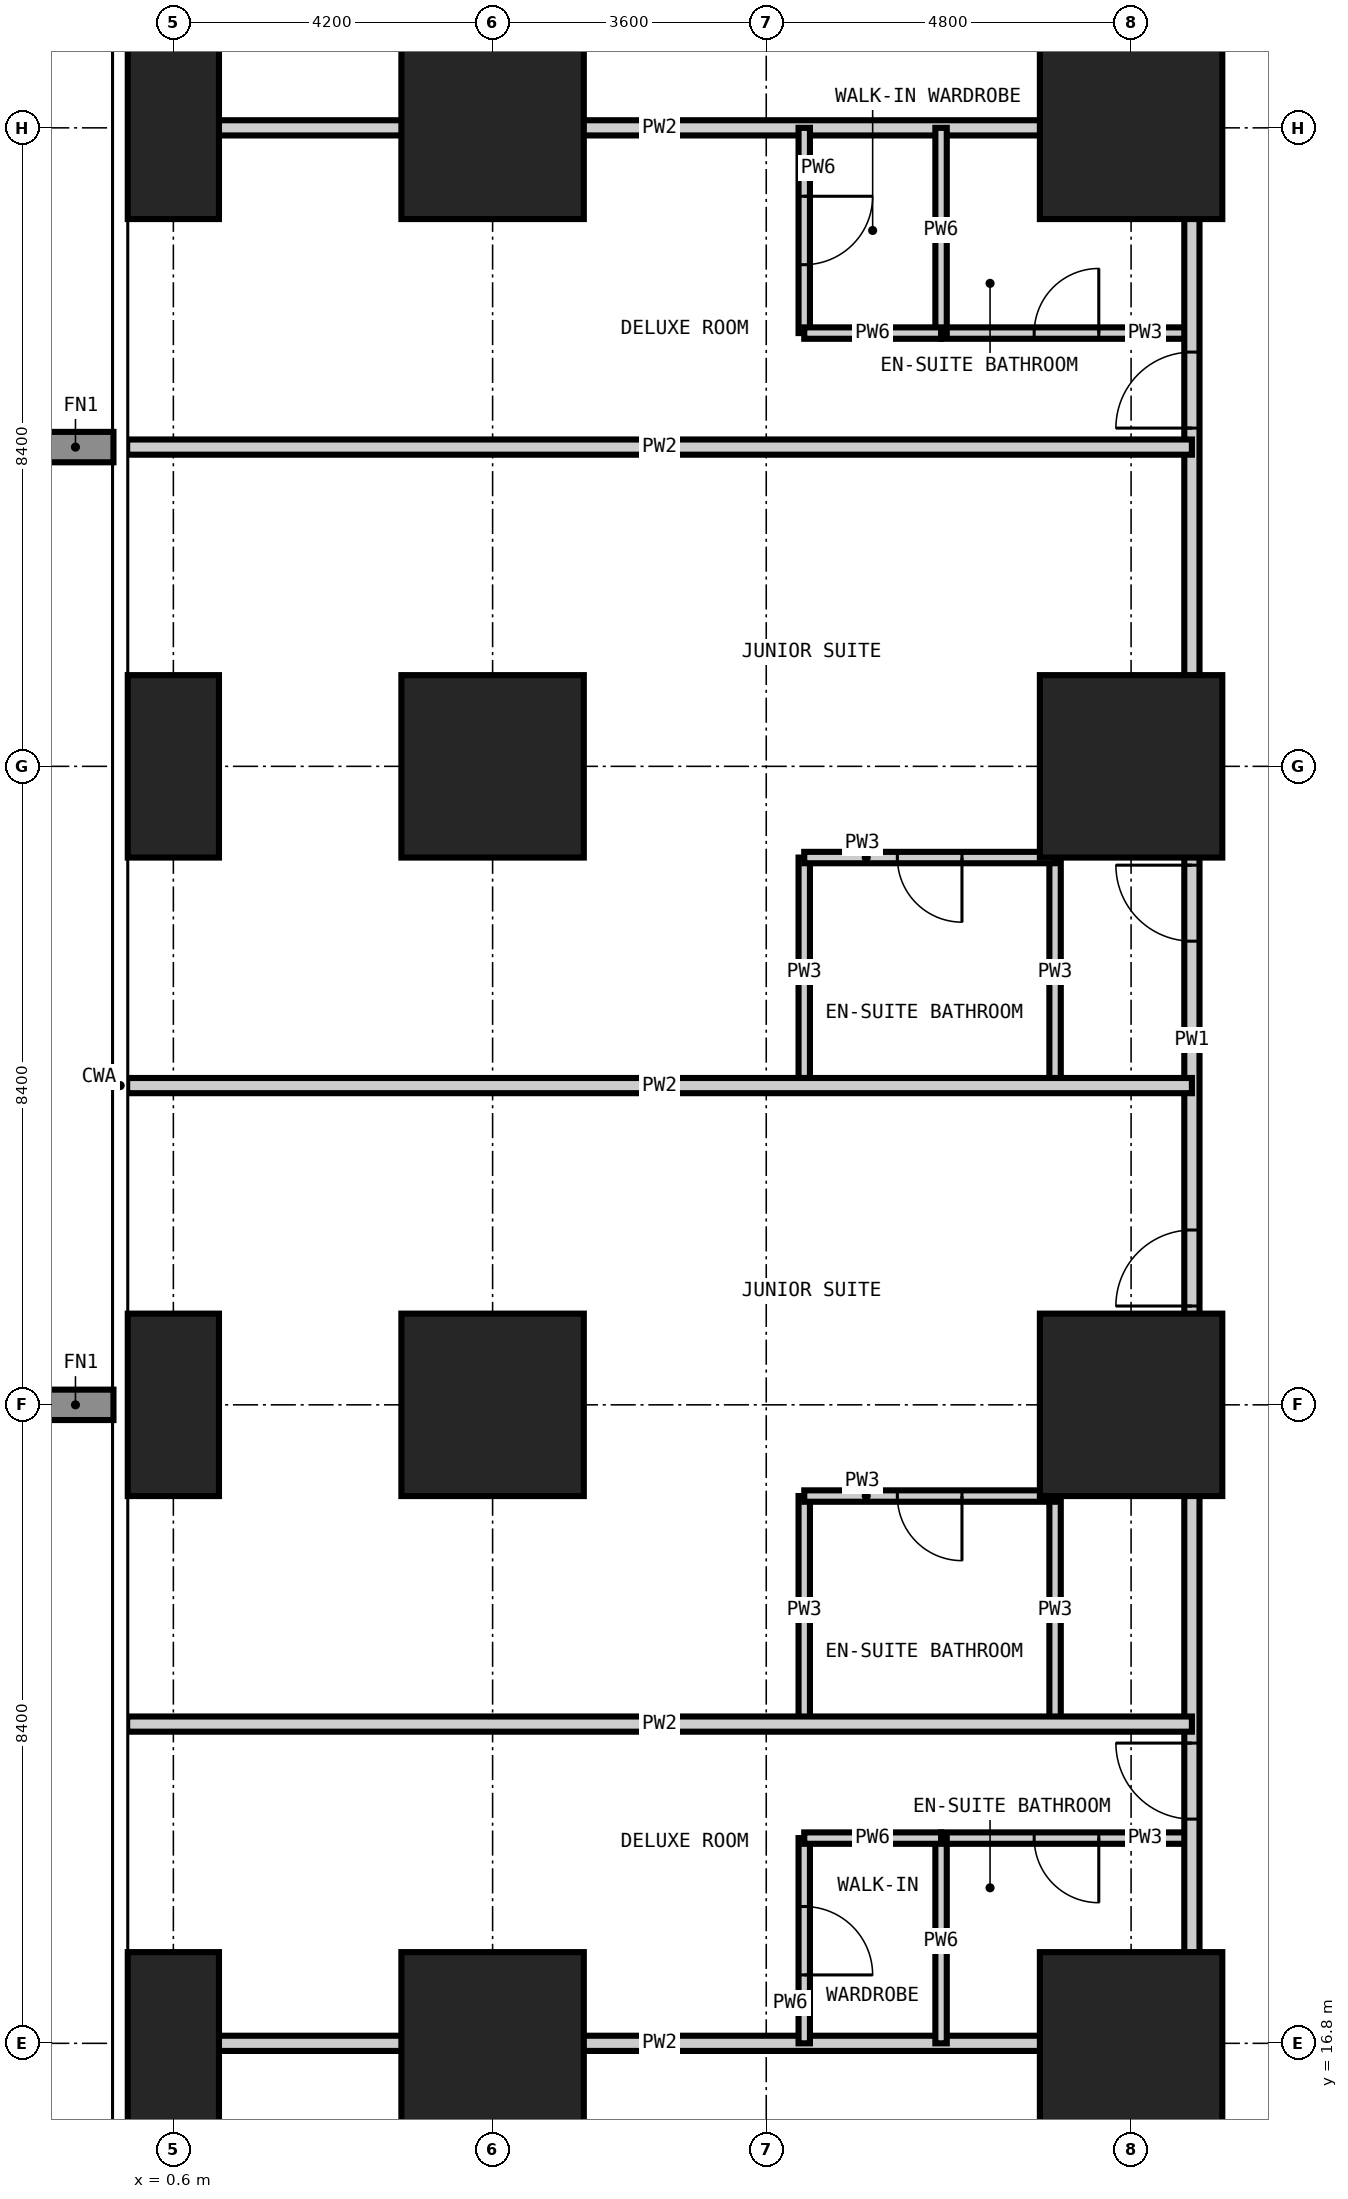
"""IFC4 building model, lengths in metres.
Left out: names, types, materials, properties, quantities, classifications, styles, units other than length and angle.
Written with IfcOpenShell. Run it as: python <this file> out.ifc"""

import sys

from ifc_helpers import new_model, si_unit, direction, frame, frame_2d, origin, origin_2d, place, context, subcontext, project, spatial, rectangle, extrude, element, fill, save


model = new_model("IFC4")
c1 = context("Model", 3, precision=1e-05, world=origin(), true_north=direction((0.0, 1.0)))
c2 = subcontext(c1, "Body", "Model", "MODEL_VIEW")
j1 = project(units=[si_unit("LENGTHUNIT", "METRE"), si_unit("PLANEANGLEUNIT", "RADIAN")], contexts=[c1])
p1 = place(None, origin())
s1 = spatial("IfcSite", under=j1, at=p1, CompositionType="ELEMENT")
p2 = place(p1, origin())
s2 = spatial("IfcBuilding", under=s1, at=p2, CompositionType="ELEMENT")
p3 = place(p2, frame((0.0, 0.0, 81.0)))
s3 = spatial("IfcBuildingStorey", under=s2, at=p3, CompositionType="ELEMENT", Elevation=81.0)
for number, where, z_axis, x_axis in (
    (1, (0.6, 16.8, -0.35), (0.0, 0.0, 1.0), (1.0, 0.0, 0.0)),
    (2, (0.6, 25.2, -0.35), (0.0, 0.0, 1.0), (1.0, 0.0, 0.0)),
    (3, (0.6, 33.6, -0.35), (0.0, 0.0, 1.0), (1.0, 0.0, 0.0)),
    (4, (0.6, 42.0, -0.35), (0.0, 0.0, 1.0), (1.0, 0.0, 0.0)),
):
    element("IfcColumn", number, at=place(p3, frame(where, z_axis=z_axis, x_axis=x_axis)), inside=s3, PredefinedType="COLUMN", context=c2, shape_type="SweptSolid", body=[
        extrude(rectangle(XDim=1.2, YDim=2.4, at=origin_2d()), origin(), (0.0, 0.0, 1.0), 3.6),
    ])
for number, where, z_axis, x_axis in (
    (5, (4.8, 16.8, -0.35), (0.0, 0.0, 1.0), (1.0, 0.0, 0.0)),
    (6, (4.8, 25.2, -0.35), (0.0, 0.0, 1.0), (1.0, 0.0, 0.0)),
    (7, (4.8, 33.6, -0.35), (0.0, 0.0, 1.0), (1.0, 0.0, 0.0)),
    (8, (4.8, 42.0, -0.35), (0.0, 0.0, 1.0), (1.0, 0.0, 0.0)),
    (9, (13.2, 16.8, -0.35), (0.0, 0.0, 1.0), (1.0, 0.0, 0.0)),
    (10, (13.2, 25.2, -0.35), (0.0, 0.0, 1.0), (1.0, 0.0, 0.0)),
    (11, (13.2, 33.6, -0.35), (0.0, 0.0, 1.0), (1.0, 0.0, 0.0)),
    (12, (13.2, 42.0, -0.35), (0.0, 0.0, 1.0), (1.0, 0.0, 0.0)),
):
    element("IfcColumn", number, at=place(p3, frame(where, z_axis=z_axis, x_axis=x_axis)), inside=s3, PredefinedType="COLUMN", context=c2, shape_type="SweptSolid", body=[
        extrude(rectangle(XDim=2.4, YDim=2.4, at=origin_2d()), origin(), (0.0, 0.0, 1.0), 3.6),
    ])
for number, where, z_axis, x_axis in (
    (13, (8.9, 21.0, 0.0), (0.0, 0.0, 1.0), (0.0, 1.0, 0.0)),
    (14, (8.9, 29.4, 0.0), (0.0, 0.0, 1.0), (0.0, 1.0, 0.0)),
    (15, (12.2, 21.0, 0.0), (0.0, 0.0, 1.0), (0.0, 1.0, 0.0)),
    (16, (12.2, 29.4, 0.0), (0.0, 0.0, 1.0), (0.0, 1.0, 0.0)),
):
    element("IfcWall", number, at=place(p3, frame(where, z_axis=z_axis, x_axis=x_axis)), inside=s3, PredefinedType="PARTITIONING", context=c2, shape_type="SweptSolid", body=[
        extrude(rectangle(XDim=3.0, YDim=0.15, at=frame_2d((1.5, 0.0))), origin(), (0.0, 0.0, 1.0), 3.25),
    ])
p4 = place(p3, frame((10.7, 19.5, 0.0), z_axis=(0.0, 0.0, 1.0), x_axis=(1.0, 0.0, 0.0)))
e17 = element("IfcWall", 17, at=p4, inside=s3, PredefinedType="PARTITIONING", context=c2, shape_type="SweptSolid", body=[
    extrude(rectangle(XDim=3.3, YDim=0.15, at=frame_2d((1.65, 0.0))), origin(), (0.0, 0.0, 1.0), 3.25),
])
p5 = place(p4, frame((1.225, 0.0, 0.0)))
e18 = element("IfcOpeningElement", 18, at=p5, cuts=e17, PredefinedType="OPENING", context=c2, shape_type="SweptSolid", body=[
    extrude(rectangle(XDim=0.85, YDim=2.1, at=frame_2d((0.425, 1.05))), frame((0.0, 0.085, 0.0), z_axis=(0.0, -1.0, 0.0), x_axis=(1.0, 0.0, 0.0)), (0.0, 0.0, 1.0), 0.17),
])
p6 = place(p3, frame((8.9, 24.0, 0.0), z_axis=(0.0, 0.0, 1.0), x_axis=(1.0, 0.0, 0.0)))
e19 = element("IfcWall", 19, at=p6, inside=s3, PredefinedType="PARTITIONING", context=c2, shape_type="SweptSolid", body=[
    extrude(rectangle(XDim=3.3, YDim=0.15, at=frame_2d((1.65, 0.0))), origin(), (0.0, 0.0, 1.0), 3.25),
])
p7 = place(p6, frame((1.225, 0.0, 0.0)))
e20 = element("IfcOpeningElement", 20, at=p7, cuts=e19, PredefinedType="OPENING", context=c2, shape_type="SweptSolid", body=[
    extrude(rectangle(XDim=0.85, YDim=2.1, at=frame_2d((0.425, 1.05))), frame((0.0, 0.085, 0.0), z_axis=(0.0, -1.0, 0.0), x_axis=(1.0, 0.0, 0.0)), (0.0, 0.0, 1.0), 0.17),
])
p8 = place(p3, frame((8.9, 32.4, 0.0), z_axis=(0.0, 0.0, 1.0), x_axis=(1.0, 0.0, 0.0)))
e21 = element("IfcWall", 21, at=p8, inside=s3, PredefinedType="PARTITIONING", context=c2, shape_type="SweptSolid", body=[
    extrude(rectangle(XDim=3.3, YDim=0.15, at=frame_2d((1.65, 0.0))), origin(), (0.0, 0.0, 1.0), 3.25),
])
p9 = place(p8, frame((1.225, 0.0, 0.0)))
e22 = element("IfcOpeningElement", 22, at=p9, cuts=e21, PredefinedType="OPENING", context=c2, shape_type="SweptSolid", body=[
    extrude(rectangle(XDim=0.85, YDim=2.1, at=frame_2d((0.425, 1.05))), frame((0.0, 0.085, 0.0), z_axis=(0.0, -1.0, 0.0), x_axis=(1.0, 0.0, 0.0)), (0.0, 0.0, 1.0), 0.17),
])
p10 = place(p3, frame((10.7, 39.3, 0.0), z_axis=(0.0, 0.0, 1.0), x_axis=(1.0, 0.0, 0.0)))
e23 = element("IfcWall", 23, at=p10, inside=s3, PredefinedType="PARTITIONING", context=c2, shape_type="SweptSolid", body=[
    extrude(rectangle(XDim=3.3, YDim=0.15, at=frame_2d((1.65, 0.0))), origin(), (0.0, 0.0, 1.0), 3.25),
])
p11 = place(p10, frame((1.225, 0.0, 0.0)))
e24 = element("IfcOpeningElement", 24, at=p11, cuts=e23, PredefinedType="OPENING", context=c2, shape_type="SweptSolid", body=[
    extrude(rectangle(XDim=0.85, YDim=2.1, at=frame_2d((0.425, 1.05))), frame((0.0, 0.085, 0.0), z_axis=(0.0, -1.0, 0.0), x_axis=(1.0, 0.0, 0.0)), (0.0, 0.0, 1.0), 0.17),
])
p12 = place(p3, frame((14.0, 14.0, 0.0), z_axis=(0.0, 0.0, 1.0), x_axis=(0.0, 1.0, 0.0)))
e25 = element("IfcWall", 25, at=p12, inside=s3, PredefinedType="PARTITIONING", context=c2, shape_type="SweptSolid", body=[
    extrude(rectangle(XDim=32.0, YDim=0.2, at=frame_2d((16.0, 0.0))), origin(), (0.0, 0.0, 1.0), 3.25),
])
p13 = place(p12, frame((5.75, 0.0, 0.0)))
e26 = element("IfcOpeningElement", 26, at=p13, cuts=e25, PredefinedType="OPENING", context=c2, shape_type="SweptSolid", body=[
    extrude(rectangle(XDim=1.0, YDim=2.2, at=frame_2d((0.5, 1.1))), frame((0.0, 0.11, 0.0), z_axis=(0.0, -1.0, 0.0), x_axis=(1.0, 0.0, 0.0)), (0.0, 0.0, 1.0), 0.22),
])
p14 = place(p12, frame((12.5, 0.0, 0.0)))
e27 = element("IfcOpeningElement", 27, at=p14, cuts=e25, PredefinedType="OPENING", context=c2, shape_type="SweptSolid", body=[
    extrude(rectangle(XDim=1.0, YDim=2.2, at=frame_2d((0.5, 1.1))), frame((0.0, 0.11, 0.0), z_axis=(0.0, -1.0, 0.0), x_axis=(1.0, 0.0, 0.0)), (0.0, 0.0, 1.0), 0.22),
])
p15 = place(p12, frame((17.3, 0.0, 0.0)))
e28 = element("IfcOpeningElement", 28, at=p15, cuts=e25, PredefinedType="OPENING", context=c2, shape_type="SweptSolid", body=[
    extrude(rectangle(XDim=1.0, YDim=2.2, at=frame_2d((0.5, 1.1))), frame((0.0, 0.11, 0.0), z_axis=(0.0, -1.0, 0.0), x_axis=(1.0, 0.0, 0.0)), (0.0, 0.0, 1.0), 0.22),
])
p16 = place(p12, frame((24.05, 0.0, 0.0)))
e29 = element("IfcOpeningElement", 29, at=p16, cuts=e25, PredefinedType="OPENING", context=c2, shape_type="SweptSolid", body=[
    extrude(rectangle(XDim=1.0, YDim=2.2, at=frame_2d((0.5, 1.1))), frame((0.0, 0.11, 0.0), z_axis=(0.0, -1.0, 0.0), x_axis=(1.0, 0.0, 0.0)), (0.0, 0.0, 1.0), 0.22),
])
p17 = place(p12, frame((0.5, 0.0, 0.0)))
e30 = element("IfcOpeningElement", 30, at=p17, cuts=e25, PredefinedType="OPENING", context=c2, shape_type="SweptSolid", body=[
    extrude(rectangle(XDim=1.0, YDim=2.2, at=frame_2d((0.5, 1.1))), frame((0.0, 0.11, 0.0), z_axis=(0.0, -1.0, 0.0), x_axis=(1.0, 0.0, 0.0)), (0.0, 0.0, 1.0), 0.22),
])
p18 = place(p12, frame((29.5, 0.0, 0.0)))
e31 = element("IfcOpeningElement", 31, at=p18, cuts=e25, PredefinedType="OPENING", context=c2, shape_type="SweptSolid", body=[
    extrude(rectangle(XDim=1.0, YDim=2.2, at=frame_2d((0.5, 1.1))), frame((0.0, 0.11, 0.0), z_axis=(0.0, -1.0, 0.0), x_axis=(1.0, 0.0, 0.0)), (0.0, 0.0, 1.0), 0.22),
])
for number, where, z_axis, x_axis in (
    (32, (-0.008, 16.8, 0.0), (0.0, 0.0, 1.0), (1.0, 0.0, 0.0)),
    (33, (-0.008, 21.0, 0.0), (0.0, 0.0, 1.0), (1.0, 0.0, 0.0)),
    (34, (-0.008, 29.4, 0.0), (0.0, 0.0, 1.0), (1.0, 0.0, 0.0)),
    (35, (-0.008, 37.8, 0.0), (0.0, 0.0, 1.0), (1.0, 0.0, 0.0)),
    (36, (-0.008, 42.0, 0.0), (0.0, 0.0, 1.0), (1.0, 0.0, 0.0)),
):
    element("IfcWall", number, at=place(p3, frame(where, z_axis=z_axis, x_axis=x_axis)), inside=s3, PredefinedType="PARTITIONING", context=c2, shape_type="SweptSolid", body=[
        extrude(rectangle(XDim=14.008, YDim=0.2, at=frame_2d((7.004, 0.0))), origin(), (0.0, 0.0, 1.0), 3.25),
    ])
p19 = place(p3, frame((8.9, 16.8, 0.0), z_axis=(0.0, 0.0, 1.0), x_axis=(0.0, 1.0, 0.0)))
e37 = element("IfcWall", 37, at=p19, inside=s3, PredefinedType="PARTITIONING", context=c2, shape_type="SweptSolid", body=[
    extrude(rectangle(XDim=2.7, YDim=0.15, at=frame_2d((1.35, 0.0))), origin(), (0.0, 0.0, 1.0), 3.25),
])
p20 = place(p19, frame((0.9, 0.0, 0.0)))
e38 = element("IfcOpeningElement", 38, at=p20, cuts=e37, PredefinedType="OPENING", context=c2, shape_type="SweptSolid", body=[
    extrude(rectangle(XDim=0.9, YDim=2.1, at=frame_2d((0.45, 1.05))), frame((0.0, 0.085, 0.0), z_axis=(0.0, -1.0, 0.0), x_axis=(1.0, 0.0, 0.0)), (0.0, 0.0, 1.0), 0.17),
])
p21 = place(p3, frame((8.9, 39.3, 0.0), z_axis=(0.0, 0.0, 1.0), x_axis=(0.0, 1.0, 0.0)))
e39 = element("IfcWall", 39, at=p21, inside=s3, PredefinedType="PARTITIONING", context=c2, shape_type="SweptSolid", body=[
    extrude(rectangle(XDim=2.7, YDim=0.15, at=frame_2d((1.35, 0.0))), origin(), (0.0, 0.0, 1.0), 3.25),
])
p22 = place(p21, frame((0.9, 0.0, 0.0)))
e40 = element("IfcOpeningElement", 40, at=p22, cuts=e39, PredefinedType="OPENING", context=c2, shape_type="SweptSolid", body=[
    extrude(rectangle(XDim=0.9, YDim=2.1, at=frame_2d((0.45, 1.05))), frame((0.0, 0.085, 0.0), z_axis=(0.0, -1.0, 0.0), x_axis=(1.0, 0.0, 0.0)), (0.0, 0.0, 1.0), 0.17),
])
for number, where, z_axis, x_axis in (
    (41, (10.7, 16.8, 0.0), (0.0, 0.0, 1.0), (0.0, 1.0, 0.0)),
    (42, (10.7, 39.3, 0.0), (0.0, 0.0, 1.0), (0.0, 1.0, 0.0)),
):
    element("IfcWall", number, at=place(p3, frame(where, z_axis=z_axis, x_axis=x_axis)), inside=s3, PredefinedType="PARTITIONING", context=c2, shape_type="SweptSolid", body=[
        extrude(rectangle(XDim=2.7, YDim=0.15, at=frame_2d((1.35, 0.0))), origin(), (0.0, 0.0, 1.0), 3.25),
    ])
for number, where, z_axis, x_axis in (
    (43, (8.9, 19.5, 0.0), (0.0, 0.0, 1.0), (1.0, 0.0, 0.0)),
    (44, (8.9, 39.3, 0.0), (0.0, 0.0, 1.0), (1.0, 0.0, 0.0)),
):
    element("IfcWall", number, at=place(p3, frame(where, z_axis=z_axis, x_axis=x_axis)), inside=s3, PredefinedType="PARTITIONING", context=c2, shape_type="SweptSolid", body=[
        extrude(rectangle(XDim=1.8, YDim=0.15, at=frame_2d((0.9, 0.0))), origin(), (0.0, 0.0, 1.0), 3.25),
    ])
p23 = place(p13, origin())
e45 = element("IfcDoor", 45, at=p23, inside=s3, OperationType="SINGLE_SWING_RIGHT", PredefinedType="DOOR", context=c2, shape_type="SweptSolid", body=[
    extrude(rectangle(XDim=1.0, YDim=2.2, at=frame_2d((0.5, 1.1))), frame((0.0, 0.025, 0.0), z_axis=(0.0, -1.0, 0.0), x_axis=(1.0, 0.0, 0.0)), (0.0, 0.0, 1.0), 0.05),
])
fill(e26, e45)
p24 = place(p5, frame((0.85, 0.0, 0.0), z_axis=(0.0, 0.0, 1.0), x_axis=(-1.0, 0.0, 0.0)))
e46 = element("IfcDoor", 46, at=p24, inside=s3, OperationType="SINGLE_SWING_LEFT", PredefinedType="DOOR", context=c2, shape_type="SweptSolid", body=[
    extrude(rectangle(XDim=0.85, YDim=2.1, at=frame_2d((0.425, 1.05))), frame((0.0, 0.025, 0.0), z_axis=(0.0, -1.0, 0.0), x_axis=(1.0, 0.0, 0.0)), (0.0, 0.0, 1.0), 0.05),
])
fill(e18, e46)
p25 = place(p20, frame((0.9, 0.0, 0.0), z_axis=(0.0, 0.0, 1.0), x_axis=(-1.0, 0.0, 0.0)))
e47 = element("IfcDoor", 47, at=p25, inside=s3, OperationType="SINGLE_SWING_RIGHT", PredefinedType="DOOR", context=c2, shape_type="SweptSolid", body=[
    extrude(rectangle(XDim=0.9, YDim=2.1, at=frame_2d((0.45, 1.05))), frame((0.0, 0.025, 0.0), z_axis=(0.0, -1.0, 0.0), x_axis=(1.0, 0.0, 0.0)), (0.0, 0.0, 1.0), 0.05),
])
fill(e38, e47)
p26 = place(p14, origin())
e48 = element("IfcDoor", 48, at=p26, inside=s3, OperationType="SINGLE_SWING_LEFT", PredefinedType="DOOR", context=c2, shape_type="SweptSolid", body=[
    extrude(rectangle(XDim=1.0, YDim=2.2, at=frame_2d((0.5, 1.1))), frame((0.0, 0.025, 0.0), z_axis=(0.0, -1.0, 0.0), x_axis=(1.0, 0.0, 0.0)), (0.0, 0.0, 1.0), 0.05),
])
fill(e27, e48)
p27 = place(p7, frame((0.85, 0.0, 0.0), z_axis=(0.0, 0.0, 1.0), x_axis=(-1.0, 0.0, 0.0)))
e49 = element("IfcDoor", 49, at=p27, inside=s3, OperationType="SINGLE_SWING_LEFT", PredefinedType="DOOR", context=c2, shape_type="SweptSolid", body=[
    extrude(rectangle(XDim=0.85, YDim=2.1, at=frame_2d((0.425, 1.05))), frame((0.0, 0.025, 0.0), z_axis=(0.0, -1.0, 0.0), x_axis=(1.0, 0.0, 0.0)), (0.0, 0.0, 1.0), 0.05),
])
fill(e20, e49)
p28 = place(p15, origin())
e50 = element("IfcDoor", 50, at=p28, inside=s3, OperationType="SINGLE_SWING_RIGHT", PredefinedType="DOOR", context=c2, shape_type="SweptSolid", body=[
    extrude(rectangle(XDim=1.0, YDim=2.2, at=frame_2d((0.5, 1.1))), frame((0.0, 0.025, 0.0), z_axis=(0.0, -1.0, 0.0), x_axis=(1.0, 0.0, 0.0)), (0.0, 0.0, 1.0), 0.05),
])
fill(e28, e50)
p29 = place(p9, frame((0.85, 0.0, 0.0), z_axis=(0.0, 0.0, 1.0), x_axis=(-1.0, 0.0, 0.0)))
e51 = element("IfcDoor", 51, at=p29, inside=s3, OperationType="SINGLE_SWING_LEFT", PredefinedType="DOOR", context=c2, shape_type="SweptSolid", body=[
    extrude(rectangle(XDim=0.85, YDim=2.1, at=frame_2d((0.425, 1.05))), frame((0.0, 0.025, 0.0), z_axis=(0.0, -1.0, 0.0), x_axis=(1.0, 0.0, 0.0)), (0.0, 0.0, 1.0), 0.05),
])
fill(e22, e51)
p30 = place(p16, origin())
e52 = element("IfcDoor", 52, at=p30, inside=s3, OperationType="SINGLE_SWING_LEFT", PredefinedType="DOOR", context=c2, shape_type="SweptSolid", body=[
    extrude(rectangle(XDim=1.0, YDim=2.2, at=frame_2d((0.5, 1.1))), frame((0.0, 0.025, 0.0), z_axis=(0.0, -1.0, 0.0), x_axis=(1.0, 0.0, 0.0)), (0.0, 0.0, 1.0), 0.05),
])
fill(e29, e52)
p31 = place(p11, origin())
e53 = element("IfcDoor", 53, at=p31, inside=s3, OperationType="SINGLE_SWING_RIGHT", PredefinedType="DOOR", context=c2, shape_type="SweptSolid", body=[
    extrude(rectangle(XDim=0.85, YDim=2.1, at=frame_2d((0.425, 1.05))), frame((0.0, 0.025, 0.0), z_axis=(0.0, -1.0, 0.0), x_axis=(1.0, 0.0, 0.0)), (0.0, 0.0, 1.0), 0.05),
])
fill(e24, e53)
p32 = place(p22, frame((0.9, 0.0, 0.0), z_axis=(0.0, 0.0, 1.0), x_axis=(-1.0, 0.0, 0.0)))
e54 = element("IfcDoor", 54, at=p32, inside=s3, OperationType="SINGLE_SWING_LEFT", PredefinedType="DOOR", context=c2, shape_type="SweptSolid", body=[
    extrude(rectangle(XDim=0.9, YDim=2.1, at=frame_2d((0.45, 1.05))), frame((0.0, 0.025, 0.0), z_axis=(0.0, -1.0, 0.0), x_axis=(1.0, 0.0, 0.0)), (0.0, 0.0, 1.0), 0.05),
])
fill(e40, e54)
save(model, sys.argv[1])
